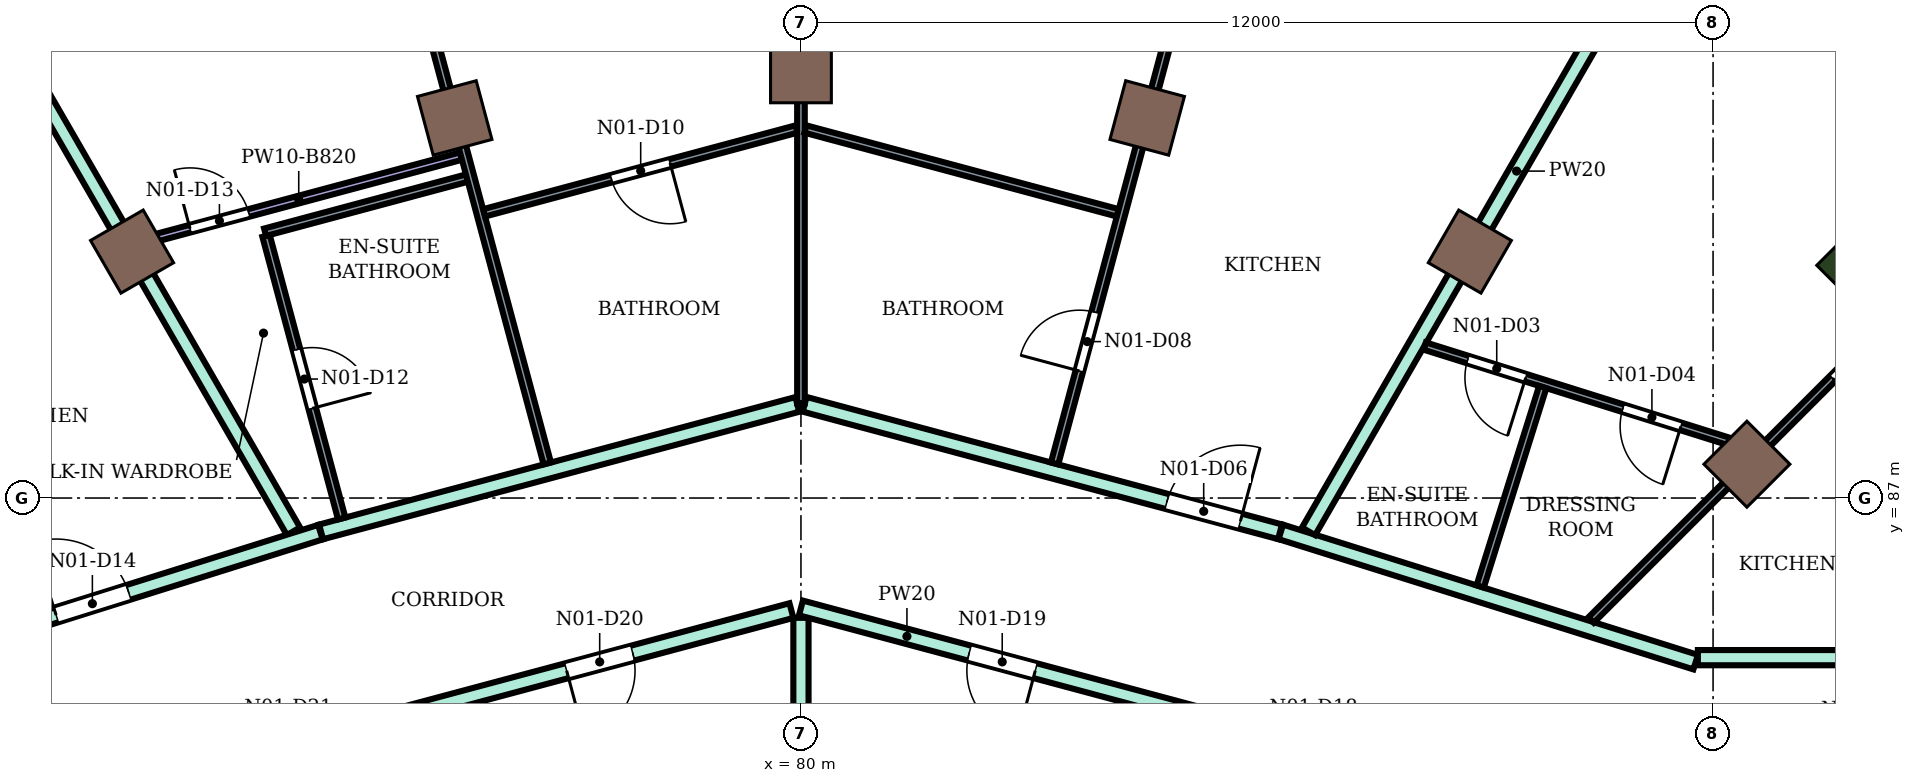
"""IFC4 building model, lengths in metres.
Left out: names, types, materials, properties, quantities, classifications, styles, units other than length and angle.
Written with IfcOpenShell. Run it as: python <this file> out.ifc"""

import sys

from ifc_helpers import new_model, si_unit, direction, frame, frame_2d, origin, origin_2d, place, context, subcontext, project, spatial, rectangle, extrude, element, fill, save


model = new_model("IFC4")
c1 = context("Model", 3, precision=1e-05, world=origin(), true_north=direction((0.0, 1.0)))
c2 = subcontext(c1, "Body", "Model", "MODEL_VIEW")
j1 = project(units=[si_unit("LENGTHUNIT", "METRE"), si_unit("PLANEANGLEUNIT", "RADIAN")], contexts=[c1])
p1 = place(None, origin())
s1 = spatial("IfcSite", under=j1, at=p1, CompositionType="ELEMENT")
p2 = place(p1, origin())
s2 = spatial("IfcBuilding", under=s1, at=p2, CompositionType="ELEMENT")
p3 = place(p2, frame((0.0, 0.0, 284.1)))
s3 = spatial("IfcBuildingStorey", under=s2, at=p3, CompositionType="ELEMENT", Elevation=284.1)
for number, where, z_axis, x_axis in (
    (1, (92.445, 87.445, 0.0), (0.0, 0.0, 1.0), (0.707, 0.707, 0.0)),
    (2, (88.8, 90.242, 0.0), (0.0, 0.0, 1.0), (0.5, 0.866, 0.0)),
    (3, (84.555, 92.0, 0.0), (0.0, 0.0, 1.0), (0.259, 0.966, 0.0)),
    (4, (80.0, 92.6, 0.0), (0.0, 0.0, 1.0), (0.0, 1.0, 0.0)),
    (5, (75.445, 92.0, 0.0), (0.0, 0.0, 1.0), (-0.259, 0.966, 0.0)),
    (6, (71.2, 90.242, 0.0), (0.0, 0.0, 1.0), (-0.5, 0.866, 0.0)),
):
    element("IfcColumn", number, at=place(p3, frame(where, z_axis=z_axis, x_axis=x_axis)), inside=s3, PredefinedType="COLUMN", context=c2, shape_type="SweptSolid", body=[
        extrude(rectangle(XDim=0.8, YDim=0.8, at=origin_2d()), origin(), (0.0, 0.0, 1.0), 4.2),
    ])
p4 = place(p3, frame((94.849, 89.849, 0.0), z_axis=(0.0, 0.0, 1.0), x_axis=(0.707106781187, 0.707106781187, 0.0)))
e7 = element("IfcColumn", 7, at=p4, inside=s3, PredefinedType="COLUMN", context=c2, shape_type="SweptSolid", body=[
    extrude(rectangle(XDim=1.8, YDim=2.4, at=origin_2d()), origin(), (0.0, 0.0, 1.0), 4.2),
])
p5 = place(p3, frame((67.852, 96.042, 0.0), z_axis=(0.0, 0.0, 1.0), x_axis=(0.499960582802, -0.866048160118, 0.0)))
e8 = element("IfcWall", 8, at=p5, inside=s3, PredefinedType="PARTITIONING", context=c2, shape_type="SweptSolid", body=[
    extrude(rectangle(XDim=10.946, YDim=0.2, at=frame_2d((5.473, 0.0))), origin(), (0.0, 0.0, 1.0), 3.75),
])
p6 = place(p3, frame((68.2, 84.833, 0.0), z_axis=(0.0, 0.0, 1.0), x_axis=(0.954191968402, 0.299195065863, 0.0)))
e9 = element("IfcWall", 9, at=p6, inside=s3, PredefinedType="PARTITIONING", context=c2, shape_type="SweptSolid", body=[
    extrude(rectangle(XDim=5.74, YDim=0.2, at=frame_2d((2.87, 0.0))), origin(), (0.0, 0.0, 1.0), 3.75),
])
p7 = place(p6, frame((2.097, 0.0, 0.0)))
e10 = element("IfcOpeningElement", 10, at=p7, cuts=e9, PredefinedType="OPENING", context=c2, shape_type="SweptSolid", body=[
    extrude(rectangle(XDim=1.0, YDim=2.1, at=frame_2d((0.5, 1.05))), frame((0.0, 0.11, 0.0), z_axis=(0.0, -1.0, 0.0), x_axis=(1.0, 0.0, 0.0)), (0.0, 0.0, 1.0), 0.22),
])
p8 = place(p3, frame((73.687, 86.554, 0.0), z_axis=(0.0, 0.0, 1.0), x_axis=(0.966002126521, 0.258534120682, 0.0)))
e11 = element("IfcWall", 11, at=p8, inside=s3, PredefinedType="PARTITIONING", context=c2, shape_type="SweptSolid", body=[
    extrude(rectangle(XDim=6.486, YDim=0.2, at=frame_2d((3.243, 0.0))), origin(), (0.0, 0.0, 1.0), 3.75),
])
p9 = place(p3, frame((74.413, 84.057, 0.0), z_axis=(0.0, 0.0, 1.0), x_axis=(0.965972135939, 0.258646153246, 0.0)))
e12 = element("IfcWall", 12, at=p9, inside=s3, PredefinedType="PARTITIONING", context=c2, shape_type="SweptSolid", body=[
    extrude(rectangle(XDim=5.654, YDim=0.2, at=frame_2d((2.827, 0.0))), origin(), (0.0, 0.0, 1.0), 3.75),
])
p10 = place(p9, frame((2.593, 0.0, 0.0)))
e13 = element("IfcOpeningElement", 13, at=p10, cuts=e12, PredefinedType="OPENING", context=c2, shape_type="SweptSolid", body=[
    extrude(rectangle(XDim=0.9, YDim=2.1, at=frame_2d((0.45, 1.05))), frame((0.0, 0.11, 0.0), z_axis=(0.0, -1.0, 0.0), x_axis=(1.0, 0.0, 0.0)), (0.0, 0.0, 1.0), 0.22),
])
p11 = place(p3, frame((80.0, 82.699, 0.0), z_axis=(0.0, 0.0, 1.0), x_axis=(0.0, 1.0, 0.0)))
e14 = element("IfcWall", 14, at=p11, inside=s3, PredefinedType="PARTITIONING", context=c2, shape_type="SweptSolid", body=[
    extrude(rectangle(XDim=2.725, YDim=0.2, at=frame_2d((1.363, 0.0))), origin(), (0.0, 0.0, 1.0), 3.75),
])
p12 = place(p3, frame((80.0, 85.554, 0.0), z_axis=(0.0, 0.0, 1.0), x_axis=(0.965928989968, -0.258807237802, 0.0)))
e15 = element("IfcWall", 15, at=p12, inside=s3, PredefinedType="PARTITIONING", context=c2, shape_type="SweptSolid", body=[
    extrude(rectangle(XDim=5.774, YDim=0.2, at=frame_2d((2.887, 0.0))), origin(), (0.0, 0.0, 1.0), 3.75),
])
p13 = place(p12, frame((2.292, 0.0, 0.0)))
e16 = element("IfcOpeningElement", 16, at=p13, cuts=e15, PredefinedType="OPENING", context=c2, shape_type="SweptSolid", body=[
    extrude(rectangle(XDim=0.9, YDim=2.1, at=frame_2d((0.45, 1.05))), frame((0.0, 0.11, 0.0), z_axis=(0.0, -1.0, 0.0), x_axis=(1.0, 0.0, 0.0)), (0.0, 0.0, 1.0), 0.22),
])
p14 = place(p3, frame((80.048, 88.233, 0.0), z_axis=(0.0, 0.0, 1.0), x_axis=(0.965865387308, -0.259044501198, 0.0)))
e17 = element("IfcWall", 17, at=p14, inside=s3, PredefinedType="PARTITIONING", context=c2, shape_type="SweptSolid", body=[
    extrude(rectangle(XDim=6.476, YDim=0.2, at=frame_2d((3.238, 0.0))), origin(), (0.0, 0.0, 1.0), 3.75),
])
p15 = place(p14, frame((4.936, 0.0, 0.0)))
e18 = element("IfcOpeningElement", 18, at=p15, cuts=e17, PredefinedType="OPENING", context=c2, shape_type="SweptSolid", body=[
    extrude(rectangle(XDim=1.0, YDim=2.1, at=frame_2d((0.5, 1.05))), frame((0.0, 0.11, 0.0), z_axis=(0.0, -1.0, 0.0), x_axis=(1.0, 0.0, 0.0)), (0.0, 0.0, 1.0), 0.22),
])
p16 = place(p3, frame((86.313, 86.554, 0.0), z_axis=(0.0, 0.0, 1.0), x_axis=(0.954089584911, -0.299521391497, 0.0)))
e19 = element("IfcWall", 19, at=p16, inside=s3, PredefinedType="PARTITIONING", context=c2, shape_type="SweptSolid", body=[
    extrude(rectangle(XDim=5.72, YDim=0.2, at=frame_2d((2.86, 0.0))), origin(), (0.0, 0.0, 1.0), 3.75),
])
p17 = place(p3, frame((86.678, 86.562, 0.0), z_axis=(0.0, 0.0, 1.0), x_axis=(0.500133037155, 0.865948581122, 0.0)))
e20 = element("IfcWall", 20, at=p17, inside=s3, PredefinedType="PARTITIONING", context=c2, shape_type="SweptSolid", body=[
    extrude(rectangle(XDim=10.946, YDim=0.2, at=frame_2d((5.473, 0.0))), origin(), (0.0, 0.0, 1.0), 3.75),
])
p18 = place(p3, frame((91.8, 84.9, 0.0), z_axis=(0.0, 0.0, 1.0), x_axis=(1.0, 0.0, 0.0)))
e21 = element("IfcWall", 21, at=p18, inside=s3, PredefinedType="PARTITIONING", context=c2, shape_type="SweptSolid", body=[
    extrude(rectangle(XDim=2.9, YDim=0.2, at=frame_2d((1.45, 0.0))), origin(), (0.0, 0.0, 1.0), 3.75),
])
p19 = place(p3, frame((71.258, 90.354, 0.0), z_axis=(0.0, 0.0, 1.0), x_axis=(0.965955692548, 0.258707556973, 0.0)))
e22 = element("IfcWall", 22, at=p19, inside=s3, PredefinedType="PARTITIONING", context=c2, shape_type="SweptSolid", body=[
    extrude(rectangle(XDim=4.42, YDim=0.1, at=frame_2d((2.21, 0.0))), origin(), (0.0, 0.0, 1.0), 3.38),
])
p20 = place(p19, frame((0.73, 0.0, 0.0)))
e23 = element("IfcOpeningElement", 23, at=p20, cuts=e22, PredefinedType="OPENING", context=c2, shape_type="SweptSolid", body=[
    extrude(rectangle(XDim=0.8, YDim=2.1, at=frame_2d((0.4, 1.05))), frame((0.0, 0.06, 0.0), z_axis=(0.0, -1.0, 0.0), x_axis=(1.0, 0.0, 0.0)), (0.0, 0.0, 1.0), 0.12),
])
p21 = place(p3, frame((72.963, 90.449, 0.0), z_axis=(0.0, 0.0, 1.0), x_axis=(0.25854689918, -0.965998706482, 0.0)))
e24 = element("IfcWall", 24, at=p21, inside=s3, PredefinedType="PARTITIONING", context=c2, shape_type="SweptSolid", body=[
    extrude(rectangle(XDim=3.849, YDim=0.1, at=frame_2d((1.924, 0.0))), origin(), (0.0, 0.0, 1.0), 3.75),
])
p22 = place(p21, frame((1.55, 0.0, 0.0)))
e25 = element("IfcOpeningElement", 25, at=p22, cuts=e24, PredefinedType="OPENING", context=c2, shape_type="SweptSolid", body=[
    extrude(rectangle(XDim=0.8, YDim=2.1, at=frame_2d((0.4, 1.05))), frame((0.0, 0.06, 0.0), z_axis=(0.0, -1.0, 0.0), x_axis=(1.0, 0.0, 0.0)), (0.0, 0.0, 1.0), 0.12),
])
p23 = place(p3, frame((72.95, 90.497, 0.0), z_axis=(0.0, 0.0, 1.0), x_axis=(0.96588619323, 0.258966912418, 0.0)))
e26 = element("IfcWall", 26, at=p23, inside=s3, PredefinedType="PARTITIONING", context=c2, shape_type="SweptSolid", body=[
    extrude(rectangle(XDim=2.749, YDim=0.1, at=frame_2d((1.375, 0.0))), origin(), (0.0, 0.0, 1.0), 3.75),
])
p24 = place(p3, frame((73.712, 98.47, 0.0), z_axis=(0.0, 0.0, 1.0), x_axis=(0.258727167471, -0.965950440143, 0.0)))
e27 = element("IfcWall", 27, at=p24, inside=s3, PredefinedType="PARTITIONING", context=c2, shape_type="SweptSolid", body=[
    extrude(rectangle(XDim=11.404, YDim=0.1, at=frame_2d((5.702, 0.0))), origin(), (0.0, 0.0, 1.0), 3.75),
])
p25 = place(p24, frame((3.187, 0.0, 0.0)))
e28 = element("IfcOpeningElement", 28, at=p25, cuts=e27, PredefinedType="OPENING", context=c2, shape_type="SweptSolid", body=[
    extrude(rectangle(XDim=0.9, YDim=2.1, at=frame_2d((0.45, 1.05))), frame((0.0, 0.06, 0.0), z_axis=(0.0, -1.0, 0.0), x_axis=(1.0, 0.0, 0.0)), (0.0, 0.0, 1.0), 0.12),
])
p26 = place(p3, frame((75.832, 90.752, 0.0), z_axis=(0.0, 0.0, 1.0), x_axis=(0.965856843682, 0.259076354601, 0.0)))
e29 = element("IfcWall", 29, at=p26, inside=s3, PredefinedType="PARTITIONING", context=c2, shape_type="SweptSolid", body=[
    extrude(rectangle(XDim=4.256, YDim=0.1, at=frame_2d((2.128, 0.0))), origin(), (0.0, 0.0, 1.0), 3.75),
])
p27 = place(p26, frame((1.733, 0.0, 0.0)))
e30 = element("IfcOpeningElement", 30, at=p27, cuts=e29, PredefinedType="OPENING", context=c2, shape_type="SweptSolid", body=[
    extrude(rectangle(XDim=0.8, YDim=2.1, at=frame_2d((0.4, 1.05))), frame((0.0, 0.06, 0.0), z_axis=(0.0, -1.0, 0.0), x_axis=(1.0, 0.0, 0.0)), (0.0, 0.0, 1.0), 0.12),
])
p28 = place(p3, frame((80.0, 88.246, 0.0), z_axis=(0.0, 0.0, 1.0), x_axis=(0.0, 1.0, 0.0)))
e31 = element("IfcWall", 31, at=p28, inside=s3, PredefinedType="PARTITIONING", context=c2, shape_type="SweptSolid", body=[
    extrude(rectangle(XDim=8.454, YDim=0.1, at=frame_2d((4.227, 0.0))), origin(), (0.0, 0.0, 1.0), 3.75),
])
p29 = place(p28, frame((5.564, 0.0, 0.0)))
e32 = element("IfcOpeningElement", 32, at=p29, cuts=e31, PredefinedType="OPENING", context=c2, shape_type="SweptSolid", body=[
    extrude(rectangle(XDim=0.9, YDim=2.1, at=frame_2d((0.45, 1.05))), frame((0.0, 0.06, 0.0), z_axis=(0.0, -1.0, 0.0), x_axis=(1.0, 0.0, 0.0)), (0.0, 0.0, 1.0), 0.12),
])
p30 = place(p3, frame((80.058, 91.854, 0.0), z_axis=(0.0, 0.0, 1.0), x_axis=(0.96586069397, -0.259061999998, 0.0)))
e33 = element("IfcWall", 33, at=p30, inside=s3, PredefinedType="PARTITIONING", context=c2, shape_type="SweptSolid", body=[
    extrude(rectangle(XDim=4.256, YDim=0.1, at=frame_2d((2.128, 0.0))), origin(), (0.0, 0.0, 1.0), 3.75),
])
p31 = place(p3, frame((83.337, 87.455, 0.0), z_axis=(0.0, 0.0, 1.0), x_axis=(0.25887234328, 0.965911543509, 0.0)))
e34 = element("IfcWall", 34, at=p31, inside=s3, PredefinedType="PARTITIONING", context=c2, shape_type="SweptSolid", body=[
    extrude(rectangle(XDim=11.404, YDim=0.1, at=frame_2d((5.702, 0.0))), origin(), (0.0, 0.0, 1.0), 3.75),
])
p32 = place(p31, frame((7.326, 0.0, 0.0)))
e35 = element("IfcOpeningElement", 35, at=p32, cuts=e34, PredefinedType="OPENING", context=c2, shape_type="SweptSolid", body=[
    extrude(rectangle(XDim=0.9, YDim=2.1, at=frame_2d((0.45, 1.05))), frame((0.0, 0.06, 0.0), z_axis=(0.0, -1.0, 0.0), x_axis=(1.0, 0.0, 0.0)), (0.0, 0.0, 1.0), 0.12),
])
p33 = place(p31, frame((1.26, 0.0, 0.0)))
e36 = element("IfcOpeningElement", 36, at=p33, cuts=e34, PredefinedType="OPENING", context=c2, shape_type="SweptSolid", body=[
    extrude(rectangle(XDim=0.8, YDim=2.1, at=frame_2d((0.4, 1.05))), frame((0.0, 0.06, 0.0), z_axis=(0.0, -1.0, 0.0), x_axis=(1.0, 0.0, 0.0)), (0.0, 0.0, 1.0), 0.12),
])
p34 = place(p3, frame((88.207, 88.999, 0.0), z_axis=(0.0, 0.0, 1.0), x_axis=(0.954166656768, -0.29927577769, 0.0)))
e37 = element("IfcWall", 37, at=p34, inside=s3, PredefinedType="PARTITIONING", context=c2, shape_type="SweptSolid", body=[
    extrude(rectangle(XDim=4.542, YDim=0.1, at=frame_2d((2.271, 0.0))), origin(), (0.0, 0.0, 1.0), 3.75),
])
p35 = place(p34, frame((0.592, 0.0, 0.0)))
e38 = element("IfcOpeningElement", 38, at=p35, cuts=e37, PredefinedType="OPENING", context=c2, shape_type="SweptSolid", body=[
    extrude(rectangle(XDim=0.8, YDim=2.1, at=frame_2d((0.4, 1.05))), frame((0.0, 0.06, 0.0), z_axis=(0.0, -1.0, 0.0), x_axis=(1.0, 0.0, 0.0)), (0.0, 0.0, 1.0), 0.12),
])
p36 = place(p34, frame((2.732, 0.0, 0.0)))
e39 = element("IfcOpeningElement", 39, at=p36, cuts=e37, PredefinedType="OPENING", context=c2, shape_type="SweptSolid", body=[
    extrude(rectangle(XDim=0.8, YDim=2.1, at=frame_2d((0.4, 1.05))), frame((0.0, 0.06, 0.0), z_axis=(0.0, -1.0, 0.0), x_axis=(1.0, 0.0, 0.0)), (0.0, 0.0, 1.0), 0.12),
])
p37 = place(p3, frame((88.936, 85.836, 0.0), z_axis=(0.0, 0.0, 1.0), x_axis=(0.299371771011, 0.954136543018, 0.0)))
e40 = element("IfcWall", 40, at=p37, inside=s3, PredefinedType="PARTITIONING", context=c2, shape_type="SweptSolid", body=[
    extrude(rectangle(XDim=2.75, YDim=0.1, at=frame_2d((1.375, 0.0))), origin(), (0.0, 0.0, 1.0), 3.75),
])
p38 = place(p3, frame((90.395, 85.395, 0.0), z_axis=(0.0, 0.0, 1.0), x_axis=(0.707106781187, 0.707106781187, 0.0)))
e41 = element("IfcWall", 41, at=p38, inside=s3, PredefinedType="PARTITIONING", context=c2, shape_type="SweptSolid", body=[
    extrude(rectangle(XDim=7.0, YDim=0.1, at=frame_2d((3.5, 0.0))), origin(), (0.0, 0.0, 1.0), 3.75),
])
p39 = place(p38, frame((4.496, 0.0, 0.0)))
e42 = element("IfcOpeningElement", 42, at=p39, cuts=e41, PredefinedType="OPENING", context=c2, shape_type="SweptSolid", body=[
    extrude(rectangle(XDim=0.9, YDim=2.1, at=frame_2d((0.45, 1.05))), frame((0.0, 0.06, 0.0), z_axis=(0.0, -1.0, 0.0), x_axis=(1.0, 0.0, 0.0)), (0.0, 0.0, 1.0), 0.12),
])
p40 = place(p39, frame((0.9, 0.0, 0.0), z_axis=(0.0, 0.0, 1.0), x_axis=(-1.0, 0.0, 0.0)))
e43 = element("IfcDoor", 43, at=p40, inside=s3, OperationType="SINGLE_SWING_RIGHT", PredefinedType="DOOR", context=c2, shape_type="SweptSolid", body=[
    extrude(rectangle(XDim=0.9, YDim=2.1, at=frame_2d((0.45, 1.05))), frame((0.0, 0.025, 0.0), z_axis=(0.0, -1.0, 0.0), x_axis=(1.0, 0.0, 0.0)), (0.0, 0.0, 1.0), 0.05),
])
fill(e42, e43)
p41 = place(p35, frame((0.8, 0.0, 0.0), z_axis=(0.0, 0.0, 1.0), x_axis=(-1.0, 0.0, 0.0)))
e44 = element("IfcDoor", 44, at=p41, inside=s3, OperationType="SINGLE_SWING_LEFT", PredefinedType="DOOR", context=c2, shape_type="SweptSolid", body=[
    extrude(rectangle(XDim=0.8, YDim=2.1, at=frame_2d((0.4, 1.05))), frame((0.0, 0.025, 0.0), z_axis=(0.0, -1.0, 0.0), x_axis=(1.0, 0.0, 0.0)), (0.0, 0.0, 1.0), 0.05),
])
fill(e38, e44)
p42 = place(p36, frame((0.8, 0.0, 0.0), z_axis=(0.0, 0.0, 1.0), x_axis=(-1.0, 0.0, 0.0)))
e45 = element("IfcDoor", 45, at=p42, inside=s3, OperationType="SINGLE_SWING_LEFT", PredefinedType="DOOR", context=c2, shape_type="SweptSolid", body=[
    extrude(rectangle(XDim=0.8, YDim=2.1, at=frame_2d((0.4, 1.05))), frame((0.0, 0.025, 0.0), z_axis=(0.0, -1.0, 0.0), x_axis=(1.0, 0.0, 0.0)), (0.0, 0.0, 1.0), 0.05),
])
fill(e39, e45)
p43 = place(p15, origin())
e46 = element("IfcDoor", 46, at=p43, inside=s3, OperationType="SINGLE_SWING_RIGHT", PredefinedType="DOOR", context=c2, shape_type="SweptSolid", body=[
    extrude(rectangle(XDim=1.0, YDim=2.1, at=frame_2d((0.5, 1.05))), frame((0.0, 0.025, 0.0), z_axis=(0.0, -1.0, 0.0), x_axis=(1.0, 0.0, 0.0)), (0.0, 0.0, 1.0), 0.05),
])
fill(e18, e46)
p44 = place(p33, origin())
e47 = element("IfcDoor", 47, at=p44, inside=s3, OperationType="SINGLE_SWING_LEFT", PredefinedType="DOOR", context=c2, shape_type="SweptSolid", body=[
    extrude(rectangle(XDim=0.8, YDim=2.1, at=frame_2d((0.4, 1.05))), frame((0.0, 0.025, 0.0), z_axis=(0.0, -1.0, 0.0), x_axis=(1.0, 0.0, 0.0)), (0.0, 0.0, 1.0), 0.05),
])
fill(e36, e47)
p45 = place(p27, frame((0.8, 0.0, 0.0), z_axis=(0.0, 0.0, 1.0), x_axis=(-1.0, 0.0, 0.0)))
e48 = element("IfcDoor", 48, at=p45, inside=s3, OperationType="SINGLE_SWING_LEFT", PredefinedType="DOOR", context=c2, shape_type="SweptSolid", body=[
    extrude(rectangle(XDim=0.8, YDim=2.1, at=frame_2d((0.4, 1.05))), frame((0.0, 0.025, 0.0), z_axis=(0.0, -1.0, 0.0), x_axis=(1.0, 0.0, 0.0)), (0.0, 0.0, 1.0), 0.05),
])
fill(e30, e48)
p46 = place(p22, origin())
e49 = element("IfcDoor", 49, at=p46, inside=s3, OperationType="SINGLE_SWING_RIGHT", PredefinedType="DOOR", context=c2, shape_type="SweptSolid", body=[
    extrude(rectangle(XDim=0.8, YDim=2.1, at=frame_2d((0.4, 1.05))), frame((0.0, 0.025, 0.0), z_axis=(0.0, -1.0, 0.0), x_axis=(1.0, 0.0, 0.0)), (0.0, 0.0, 1.0), 0.05),
])
fill(e25, e49)
p47 = place(p20, origin())
e50 = element("IfcDoor", 50, at=p47, inside=s3, OperationType="SINGLE_SWING_LEFT", PredefinedType="DOOR", context=c2, shape_type="SweptSolid", body=[
    extrude(rectangle(XDim=0.8, YDim=2.1, at=frame_2d((0.4, 1.05))), frame((0.0, 0.025, 0.0), z_axis=(0.0, -1.0, 0.0), x_axis=(1.0, 0.0, 0.0)), (0.0, 0.0, 1.0), 0.05),
])
fill(e23, e50)
p48 = place(p7, origin())
e51 = element("IfcDoor", 51, at=p48, inside=s3, OperationType="SINGLE_SWING_LEFT", PredefinedType="DOOR", context=c2, shape_type="SweptSolid", body=[
    extrude(rectangle(XDim=1.0, YDim=2.1, at=frame_2d((0.5, 1.05))), frame((0.0, 0.025, 0.0), z_axis=(0.0, -1.0, 0.0), x_axis=(1.0, 0.0, 0.0)), (0.0, 0.0, 1.0), 0.05),
])
fill(e10, e51)
p49 = place(p13, frame((0.9, 0.0, 0.0), z_axis=(0.0, 0.0, 1.0), x_axis=(-1.0, 0.0, 0.0)))
e52 = element("IfcDoor", 52, at=p49, inside=s3, OperationType="SINGLE_SWING_LEFT", PredefinedType="DOOR", context=c2, shape_type="SweptSolid", body=[
    extrude(rectangle(XDim=0.9, YDim=2.1, at=frame_2d((0.45, 1.05))), frame((0.0, 0.025, 0.0), z_axis=(0.0, -1.0, 0.0), x_axis=(1.0, 0.0, 0.0)), (0.0, 0.0, 1.0), 0.05),
])
fill(e16, e52)
p50 = place(p10, frame((0.9, 0.0, 0.0), z_axis=(0.0, 0.0, 1.0), x_axis=(-1.0, 0.0, 0.0)))
e53 = element("IfcDoor", 53, at=p50, inside=s3, OperationType="SINGLE_SWING_RIGHT", PredefinedType="DOOR", context=c2, shape_type="SweptSolid", body=[
    extrude(rectangle(XDim=0.9, YDim=2.1, at=frame_2d((0.45, 1.05))), frame((0.0, 0.025, 0.0), z_axis=(0.0, -1.0, 0.0), x_axis=(1.0, 0.0, 0.0)), (0.0, 0.0, 1.0), 0.05),
])
fill(e13, e53)
save(model, sys.argv[1])
